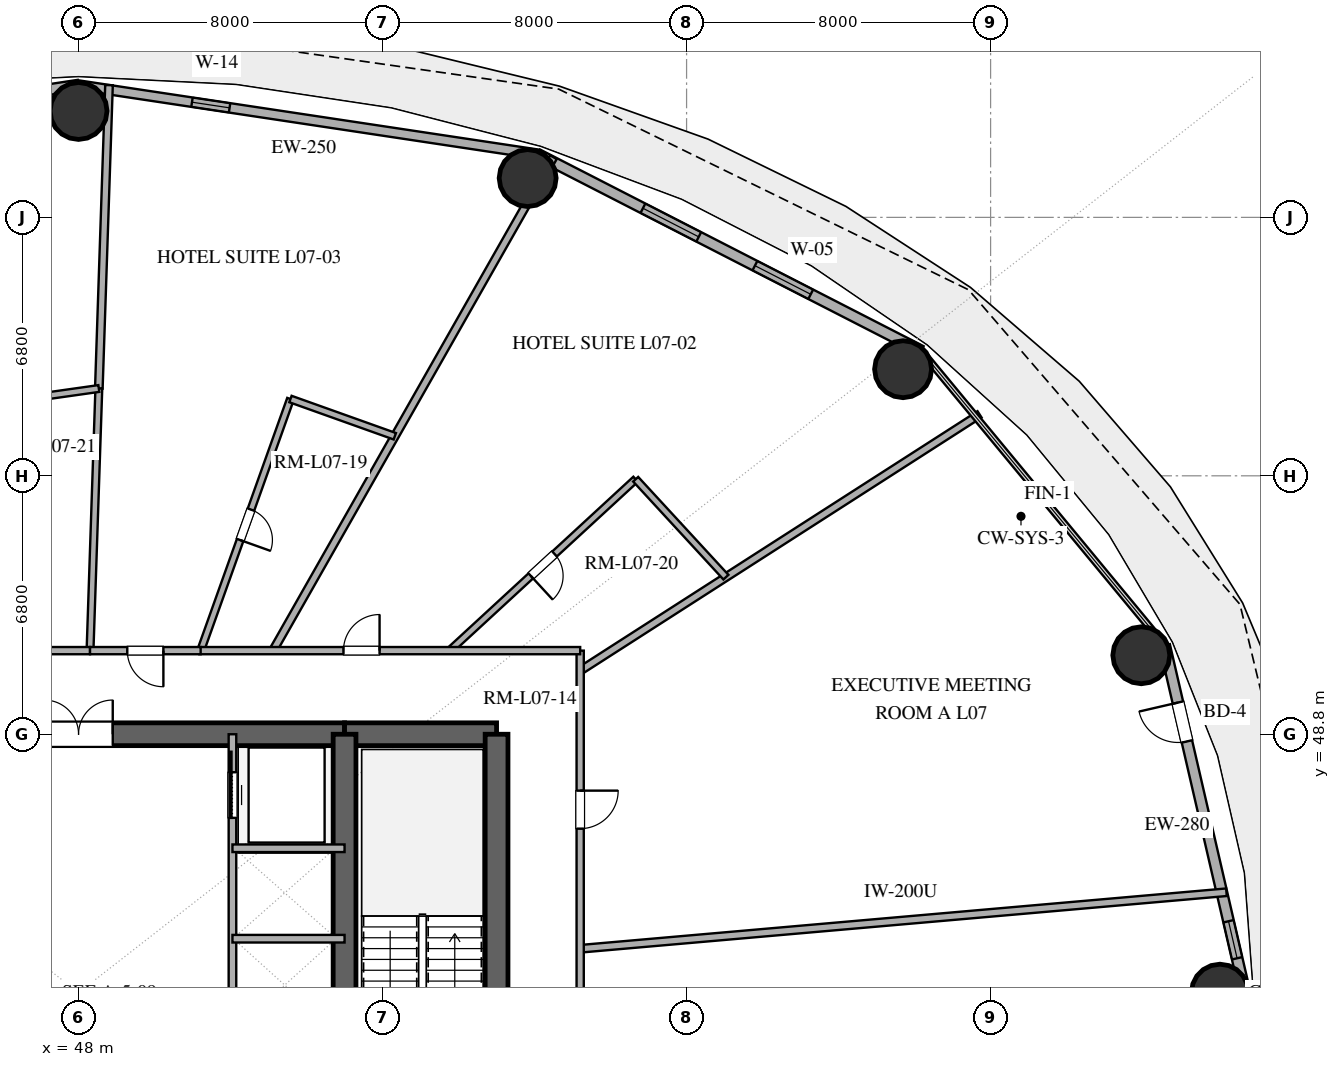
"""IFC4 building model, lengths in metres.
Left out: names, types, materials, properties, quantities, classifications, styles, units other than length and angle.
Written with IfcOpenShell. Run it as: python <this file> out.ifc"""

import sys

from ifc_helpers import new_model, si_unit, direction, frame, frame_2d, origin, origin_2d, place, context, subcontext, project, spatial, rectangle, hollow_circle, extrude, element, fill, save


model = new_model("IFC4")
c1 = context("Model", 3, precision=1e-05, world=origin(), true_north=direction((0.0, 1.0)))
c2 = subcontext(c1, "Body", "Model", "MODEL_VIEW")
j1 = project(units=[si_unit("LENGTHUNIT", "METRE"), si_unit("PLANEANGLEUNIT", "RADIAN")], contexts=[c1])
p1 = place(None, origin())
s1 = spatial("IfcSite", under=j1, at=p1, CompositionType="ELEMENT")
p2 = place(p1, origin())
s2 = spatial("IfcBuilding", under=s1, at=p2, CompositionType="ELEMENT")
p3 = place(p2, frame((0.0, 0.0, 35.4)))
s3 = spatial("IfcBuildingStorey", under=s2, at=p3, CompositionType="ELEMENT", Elevation=35.4)
p4 = place(p3, frame((41.0, 48.8, 0.0), z_axis=(0.0, 0.0, 1.0), x_axis=(1.0, 0.0, 0.0)))
e1 = element("IfcWall", 1, at=p4, inside=s3, PredefinedType="SHEAR", context=c2, shape_type="SweptSolid", body=[
    extrude(rectangle(XDim=14.0, YDim=0.6, at=frame_2d((7.0, 0.0))), origin(), (0.0, 0.0, 1.0), 3.38),
])
p5 = place(p4, frame((6.1, 0.0, 0.0)))
e2 = element("IfcOpeningElement", 2, at=p5, cuts=e1, PredefinedType="OPENING", context=c2, shape_type="SweptSolid", body=[
    extrude(rectangle(XDim=1.8, YDim=2.25, at=frame_2d((0.9, 1.125))), frame((0.0, 0.31, 0.0), z_axis=(0.0, -1.0, 0.0), x_axis=(1.0, 0.0, 0.0)), (0.0, 0.0, 1.0), 0.62),
])
p6 = place(p3, frame((55.0, 48.8, 0.0), z_axis=(0.0, 0.0, 1.0), x_axis=(1.0, 0.0, 0.0)))
e3 = element("IfcWall", 3, at=p6, inside=s3, PredefinedType="SHEAR", context=c2, shape_type="SweptSolid", body=[
    extrude(rectangle(XDim=4.0, YDim=0.6, at=frame_2d((2.0, 0.0))), origin(), (0.0, 0.0, 1.0), 3.38),
])
p7 = place(p3, frame((59.0, 35.2, 0.0), z_axis=(0.0, 0.0, 1.0), x_axis=(0.0, 1.0, 0.0)))
e4 = element("IfcWall", 4, at=p7, inside=s3, PredefinedType="SHEAR", context=c2, shape_type="SweptSolid", body=[
    extrude(rectangle(XDim=13.6, YDim=0.6, at=frame_2d((6.8, 0.0))), origin(), (0.0, 0.0, 1.0), 3.38),
])
p8 = place(p7, frame((1.5, 0.0, 0.0)))
e5 = element("IfcOpeningElement", 5, at=p8, cuts=e4, PredefinedType="OPENING", context=c2, shape_type="SweptSolid", body=[
    extrude(rectangle(XDim=1.2, YDim=2.15, at=frame_2d((0.6, 1.075))), frame((0.0, 0.31, 0.0), z_axis=(0.0, -1.0, 0.0), x_axis=(1.0, 0.0, 0.0)), (0.0, 0.0, 1.0), 0.62),
])
p9 = place(p3, frame((55.0, 35.2, 0.0), z_axis=(0.0, 0.0, 1.0), x_axis=(0.0, 1.0, 0.0)))
e6 = element("IfcWall", 6, at=p9, inside=s3, PredefinedType="SHEAR", context=c2, shape_type="SweptSolid", body=[
    extrude(rectangle(XDim=13.6, YDim=0.6, at=frame_2d((6.8, 0.0))), origin(), (0.0, 0.0, 1.0), 3.38),
])
p10 = place(p9, frame((1.15, 0.0, 0.0)))
e7 = element("IfcOpeningElement", 7, at=p10, cuts=e6, PredefinedType="OPENING", context=c2, shape_type="SweptSolid", body=[
    extrude(rectangle(XDim=1.1, YDim=2.2, at=frame_2d((0.55, 1.1))), frame((0.0, 0.31, 0.0), z_axis=(0.0, -1.0, 0.0), x_axis=(1.0, 0.0, 0.0)), (0.0, 0.0, 1.0), 0.62),
])
for number, where, z_axis, x_axis in (
    (8, (78.035, 42.0, 0.0), (0.0, 0.0, 1.0), (1.0, 0.0, 0.0)),
    (9, (75.966, 50.878, 0.0), (0.0, 0.0, 1.0), (1.0, 0.0, 0.0)),
    (10, (69.697, 58.405, 0.0), (0.0, 0.0, 1.0), (1.0, 0.0, 0.0)),
    (11, (59.818, 63.434, 0.0), (0.0, 0.0, 1.0), (1.0, 0.0, 0.0)),
    (12, (48.0, 65.2, 0.0), (0.0, 0.0, 1.0), (1.0, 0.0, 0.0)),
):
    element("IfcColumn", number, at=place(p3, frame(where, z_axis=z_axis, x_axis=x_axis)), inside=s3, PredefinedType="COLUMN", context=c2, shape_type="SweptSolid", body=[
        extrude(hollow_circle(Radius=0.75, WallThickness=0.04, at=origin_2d()), origin(), (0.0, 0.0, 1.0), 3.38),
    ])
p11 = place(p3, frame((78.696, 42.0, 0.0), z_axis=(0.0, 0.0, 1.0), x_axis=(-0.225454452941, 0.974253709076, 0.0)))
e13 = element("IfcWall", 13, at=p11, inside=s3, PredefinedType="SOLIDWALL", context=c2, shape_type="SweptSolid", body=[
    extrude(rectangle(XDim=9.38, YDim=0.28, at=frame_2d((4.69, 0.0))), origin(), (0.0, 0.0, 1.0), 3.38),
])
p12 = place(p11, frame((6.785, 0.0, 0.0)))
e14 = element("IfcOpeningElement", 14, at=p12, cuts=e13, PredefinedType="OPENING", context=c2, shape_type="SweptSolid", body=[
    extrude(rectangle(XDim=1.05, YDim=2.2, at=frame_2d((0.525, 1.1))), frame((0.0, 0.15, 0.0), z_axis=(0.0, -1.0, 0.0), x_axis=(1.0, 0.0, 0.0)), (0.0, 0.0, 1.0), 0.3),
])
p13 = place(p11, frame((0.929, 0.0, 0.85)))
e15 = element("IfcOpeningElement", 15, at=p13, cuts=e13, PredefinedType="OPENING", context=c2, shape_type="SweptSolid", body=[
    extrude(rectangle(XDim=1.0, YDim=1.8, at=frame_2d((0.5, 0.9))), frame((0.0, 0.15, 0.0), z_axis=(0.0, -1.0, 0.0), x_axis=(1.0, 0.0, 0.0)), (0.0, 0.0, 1.0), 0.3),
])
p14 = place(p3, frame((70.174, 58.886, 0.0), z_axis=(0.0, 0.0, 1.0), x_axis=(-0.889853976658, 0.456245438581, 0.0)))
e16 = element("IfcWall", 16, at=p14, inside=s3, PredefinedType="SOLIDWALL", context=c2, shape_type="SweptSolid", body=[
    extrude(rectangle(XDim=11.346, YDim=0.28, at=frame_2d((5.673, 0.0))), origin(), (0.0, 0.0, 1.0), 3.38),
])
p15 = place(p14, frame((3.267, 0.0, 0.85)))
e17 = element("IfcOpeningElement", 17, at=p15, cuts=e16, PredefinedType="OPENING", context=c2, shape_type="SweptSolid", body=[
    extrude(rectangle(XDim=1.65, YDim=2.0, at=frame_2d((0.825, 1.0))), frame((0.0, 0.15, 0.0), z_axis=(0.0, -1.0, 0.0), x_axis=(1.0, 0.0, 0.0)), (0.0, 0.0, 1.0), 0.3),
])
p16 = place(p14, frame((6.579, 0.0, 0.85)))
e18 = element("IfcOpeningElement", 18, at=p16, cuts=e16, PredefinedType="OPENING", context=c2, shape_type="SweptSolid", body=[
    extrude(rectangle(XDim=1.65, YDim=2.0, at=frame_2d((0.825, 1.0))), frame((0.0, 0.15, 0.0), z_axis=(0.0, -1.0, 0.0), x_axis=(1.0, 0.0, 0.0)), (0.0, 0.0, 1.0), 0.3),
])
p17 = place(p3, frame((60.078, 64.062, 0.0), z_axis=(0.0, 0.0, 1.0), x_axis=(-0.988864835849, 0.148816452121, 0.0)))
e19 = element("IfcWall", 19, at=p17, inside=s3, PredefinedType="SOLIDWALL", context=c2, shape_type="SweptSolid", body=[
    extrude(rectangle(XDim=12.214, YDim=0.25, at=frame_2d((6.107, 0.0))), origin(), (0.0, 0.0, 1.0), 3.38),
])
p18 = place(p17, frame((8.195, 0.0, 1.42)))
e20 = element("IfcOpeningElement", 20, at=p18, cuts=e19, PredefinedType="OPENING", context=c2, shape_type="SweptSolid", body=[
    extrude(rectangle(XDim=1.0, YDim=1.05, at=frame_2d((0.5, 0.525))), frame((0.0, 0.135, 0.0), z_axis=(0.0, -1.0, 0.0), x_axis=(1.0, 0.0, 0.0)), (0.0, 0.0, 1.0), 0.27),
])
p19 = place(p3, frame((48.0, 65.88, 0.0), z_axis=(0.0, 0.0, 1.0), x_axis=(-0.988864835849, -0.148816452121, 0.0)))
e21 = element("IfcWall", 21, at=p19, inside=s3, PredefinedType="SOLIDWALL", context=c2, shape_type="SweptSolid", body=[
    extrude(rectangle(XDim=12.214, YDim=0.28, at=frame_2d((6.107, 0.0))), origin(), (0.0, 0.0, 1.0), 3.38),
])
p20 = place(p19, frame((1.531, 0.0, 0.0)))
e22 = element("IfcOpeningElement", 22, at=p20, cuts=e21, PredefinedType="OPENING", context=c2, shape_type="SweptSolid", body=[
    extrude(rectangle(XDim=1.6, YDim=2.25, at=frame_2d((0.8, 1.125))), frame((0.0, 0.15, 0.0), z_axis=(0.0, -1.0, 0.0), x_axis=(1.0, 0.0, 0.0)), (0.0, 0.0, 1.0), 0.3),
])
p21 = place(p3, frame((52.05, 38.4, 0.0), z_axis=(0.0, 0.0, 1.0), x_axis=(0.0, 1.0, 0.0)))
e23 = element("IfcWall", 23, at=p21, inside=s3, PredefinedType="SOLIDWALL", context=c2, shape_type="SweptSolid", body=[
    extrude(rectangle(XDim=10.4, YDim=0.2, at=frame_2d((5.2, 0.0))), origin(), (0.0, 0.0, 1.0), 2.74),
])
p22 = place(p21, frame((8.2, 0.0, 0.0)))
e24 = element("IfcOpeningElement", 24, at=p22, cuts=e23, PredefinedType="OPENING", context=c2, shape_type="SweptSolid", body=[
    extrude(rectangle(XDim=1.2, YDim=2.2, at=frame_2d((0.6, 1.1))), frame((0.0, 0.11, 0.0), z_axis=(0.0, -1.0, 0.0), x_axis=(1.0, 0.0, 0.0)), (0.0, 0.0, 1.0), 0.22),
])
for number, where, z_axis, x_axis in (
    (25, (52.05, 43.42, 0.0), (0.0, 0.0, 1.0), (1.0, 0.0, 0.0)),
    (26, (52.05, 45.8, 0.0), (0.0, 0.0, 1.0), (1.0, 0.0, 0.0)),
):
    element("IfcWall", number, at=place(p3, frame(where, z_axis=z_axis, x_axis=x_axis)), inside=s3, PredefinedType="SOLIDWALL", context=c2, shape_type="SweptSolid", body=[
        extrude(rectangle(XDim=2.95, YDim=0.2, at=frame_2d((1.475, 0.0))), origin(), (0.0, 0.0, 1.0), 2.74),
    ])
p23 = place(p3, frame((61.2, 43.155, 0.0), z_axis=(0.0, 0.0, 1.0), x_axis=(0.996194943742, 0.087152934912, 0.0)))
e27 = element("IfcWall", 27, at=p23, inside=s3, PredefinedType="PARTITIONING", context=c2, shape_type="SweptSolid", body=[
    extrude(rectangle(XDim=17.071, YDim=0.2, at=frame_2d((8.536, 0.0))), origin(), (0.0, 0.0, 1.0), 2.74),
])
p24 = place(p3, frame((53.116, 51.0, 0.0), z_axis=(0.0, 0.0, 1.0), x_axis=(0.494167535405, 0.869366693031, 0.0)))
e28 = element("IfcWall", 28, at=p24, inside=s3, PredefinedType="PARTITIONING", context=c2, shape_type="SweptSolid", body=[
    extrude(rectangle(XDim=14.934, YDim=0.2, at=frame_2d((7.467, 0.0))), origin(), (0.0, 0.0, 1.0), 2.74),
])
p25 = place(p3, frame((48.802, 65.88, 0.0), z_axis=(0.0, 0.0, 1.0), x_axis=(-0.033562144005, -0.999436632553, 0.0)))
e29 = element("IfcWall", 29, at=p25, inside=s3, PredefinedType="PARTITIONING", context=c2, shape_type="SweptSolid", body=[
    extrude(rectangle(XDim=7.987, YDim=0.2, at=frame_2d((3.994, 0.0))), origin(), (0.0, 0.0, 1.0), 2.74),
])
p26 = place(p3, frame((61.2, 50.472, 0.0), z_axis=(0.0, 0.0, 1.0), x_axis=(0.841576538847, 0.540137879863, 0.0)))
e30 = element("IfcWall", 30, at=p26, inside=s3, PredefinedType="PARTITIONING", context=c2, shape_type="SweptSolid", body=[
    extrude(rectangle(XDim=12.487, YDim=0.2, at=frame_2d((6.244, 0.0))), origin(), (0.0, 0.0, 1.0), 2.74),
])
p27 = place(p3, frame((61.2, 51.0, 0.0), z_axis=(0.0, 0.0, 1.0), x_axis=(0.0, -1.0, 0.0)))
e31 = element("IfcWall", 31, at=p27, inside=s3, PredefinedType="PARTITIONING", context=c2, shape_type="SweptSolid", body=[
    extrude(rectangle(XDim=14.554, YDim=0.19, at=frame_2d((7.277, 0.0))), origin(), (0.0, 0.0, 1.0), 2.74),
])
p28 = place(p27, frame((3.684, 0.0, 0.0)))
e32 = element("IfcOpeningElement", 32, at=p28, cuts=e31, PredefinedType="OPENING", context=c2, shape_type="SweptSolid", body=[
    extrude(rectangle(XDim=1.0, YDim=2.2, at=frame_2d((0.5, 1.1))), frame((0.0, 0.105, 0.0), z_axis=(0.0, -1.0, 0.0), x_axis=(1.0, 0.0, 0.0)), (0.0, 0.0, 1.0), 0.21),
])
p29 = place(p27, frame((9.438, 0.0, 0.0)))
e33 = element("IfcOpeningElement", 33, at=p29, cuts=e31, PredefinedType="OPENING", context=c2, shape_type="SweptSolid", body=[
    extrude(rectangle(XDim=0.95, YDim=2.15, at=frame_2d((0.475, 1.075))), frame((0.0, 0.105, 0.0), z_axis=(0.0, -1.0, 0.0), x_axis=(1.0, 0.0, 0.0)), (0.0, 0.0, 1.0), 0.21),
])
p30 = place(p3, frame((53.576, 57.621, 0.0), z_axis=(0.0, 0.0, 1.0), x_axis=(-0.336213191961, -0.941785904307, 0.0)))
e34 = element("IfcWall", 34, at=p30, inside=s3, PredefinedType="PLUMBINGWALL", context=c2, shape_type="SweptSolid", body=[
    extrude(rectangle(XDim=7.03, YDim=0.18, at=frame_2d((3.515, 0.0))), origin(), (0.0, 0.0, 1.0), 2.74),
])
p31 = place(p30, frame((3.09, 0.0, 0.0)))
e35 = element("IfcOpeningElement", 35, at=p31, cuts=e34, PredefinedType="OPENING", context=c2, shape_type="SweptSolid", body=[
    extrude(rectangle(XDim=0.85, YDim=2.1, at=frame_2d((0.425, 1.05))), frame((0.0, 0.1, 0.0), z_axis=(0.0, -1.0, 0.0), x_axis=(1.0, 0.0, 0.0)), (0.0, 0.0, 1.0), 0.2),
])
p32 = place(p3, frame((48.534, 57.897, 0.0), z_axis=(0.0, 0.0, 1.0), x_axis=(-0.033537457551, -0.999437461246, 0.0)))
e36 = element("IfcWall", 36, at=p32, inside=s3, PredefinedType="PLUMBINGWALL", context=c2, shape_type="SweptSolid", body=[
    extrude(rectangle(XDim=6.901, YDim=0.18, at=frame_2d((3.451, 0.0))), origin(), (0.0, 0.0, 1.0), 2.74),
])
p33 = place(p3, frame((62.66, 55.51, 0.0), z_axis=(0.0, 0.0, 1.0), x_axis=(-0.735369975398, -0.67766584633, 0.0)))
e37 = element("IfcWall", 37, at=p33, inside=s3, PredefinedType="PLUMBINGWALL", context=c2, shape_type="SweptSolid", body=[
    extrude(rectangle(XDim=6.655, YDim=0.18, at=frame_2d((3.328, 0.0))), origin(), (0.0, 0.0, 1.0), 2.74),
])
p34 = place(p33, frame((2.903, 0.0, 0.0)))
e38 = element("IfcOpeningElement", 38, at=p34, cuts=e37, PredefinedType="OPENING", context=c2, shape_type="SweptSolid", body=[
    extrude(rectangle(XDim=0.85, YDim=2.1, at=frame_2d((0.425, 1.05))), frame((0.0, 0.1, 0.0), z_axis=(0.0, -1.0, 0.0), x_axis=(1.0, 0.0, 0.0)), (0.0, 0.0, 1.0), 0.2),
])
p35 = place(p3, frame((51.179, 51.0, 0.0), z_axis=(0.0, 0.0, 1.0), x_axis=(1.0, 0.0, 0.0)))
e39 = element("IfcWall", 39, at=p35, inside=s3, PredefinedType="PARTITIONING", context=c2, shape_type="SweptSolid", body=[
    extrude(rectangle(XDim=10.021, YDim=0.19, at=frame_2d((5.01, 0.0))), origin(), (0.0, 0.0, 1.0), 2.74),
])
p36 = place(p35, frame((3.792, 0.0, 0.0)))
e40 = element("IfcOpeningElement", 40, at=p36, cuts=e39, PredefinedType="OPENING", context=c2, shape_type="SweptSolid", body=[
    extrude(rectangle(XDim=0.95, YDim=2.15, at=frame_2d((0.475, 1.075))), frame((0.0, 0.105, 0.0), z_axis=(0.0, -1.0, 0.0), x_axis=(1.0, 0.0, 0.0)), (0.0, 0.0, 1.0), 0.21),
])
p37 = place(p3, frame((65.035, 52.933, 0.0), z_axis=(0.0, 0.0, 1.0), x_axis=(-0.677675106239, 0.735361442002, 0.0)))
e41 = element("IfcWall", 41, at=p37, inside=s3, PredefinedType="PLUMBINGWALL", context=c2, shape_type="SweptSolid", body=[
    extrude(rectangle(XDim=3.504, YDim=0.18, at=frame_2d((1.752, 0.0))), origin(), (0.0, 0.0, 1.0), 2.74),
])
p38 = place(p3, frame((43.62, 51.0, 0.0), z_axis=(0.0, 0.0, 1.0), x_axis=(1.0, 0.0, 0.0)))
e42 = element("IfcWall", 42, at=p38, inside=s3, PredefinedType="PARTITIONING", context=c2, shape_type="SweptSolid", body=[
    extrude(rectangle(XDim=4.683, YDim=0.19, at=frame_2d((2.341, 0.0))), origin(), (0.0, 0.0, 1.0), 2.74),
])
p39 = place(p38, frame((1.095, 0.0, 0.0)))
e43 = element("IfcOpeningElement", 43, at=p39, cuts=e42, PredefinedType="OPENING", context=c2, shape_type="SweptSolid", body=[
    extrude(rectangle(XDim=0.95, YDim=2.15, at=frame_2d((0.475, 1.075))), frame((0.0, 0.105, 0.0), z_axis=(0.0, -1.0, 0.0), x_axis=(1.0, 0.0, 0.0)), (0.0, 0.0, 1.0), 0.21),
])
p40 = place(p3, frame((56.322, 56.64, 0.0), z_axis=(0.0, 0.0, 1.0), x_axis=(-0.94177979862, 0.336230294457, 0.0)))
e44 = element("IfcWall", 44, at=p40, inside=s3, PredefinedType="PLUMBINGWALL", context=c2, shape_type="SweptSolid", body=[
    extrude(rectangle(XDim=2.915, YDim=0.18, at=frame_2d((1.458, 0.0))), origin(), (0.0, 0.0, 1.0), 2.74),
])
p41 = place(p3, frame((51.213, 51.0, 0.0), z_axis=(0.0, 0.0, 1.0), x_axis=(-1.0, 0.0, 0.0)))
e45 = element("IfcWall", 45, at=p41, inside=s3, PredefinedType="PARTITIONING", context=c2, shape_type="SweptSolid", body=[
    extrude(rectangle(XDim=2.911, YDim=0.19, at=frame_2d((1.455, 0.0))), origin(), (0.0, 0.0, 1.0), 2.74),
])
p42 = place(p41, frame((0.98, 0.0, 0.0)))
e46 = element("IfcOpeningElement", 46, at=p42, cuts=e45, PredefinedType="OPENING", context=c2, shape_type="SweptSolid", body=[
    extrude(rectangle(XDim=0.95, YDim=2.15, at=frame_2d((0.475, 1.075))), frame((0.0, 0.105, 0.0), z_axis=(0.0, -1.0, 0.0), x_axis=(1.0, 0.0, 0.0)), (0.0, 0.0, 1.0), 0.21),
])
p43 = place(p3, frame((45.807, 57.512, 0.0), z_axis=(0.0, 0.0, 1.0), x_axis=(0.990152382036, 0.139993786823, 0.0)))
e47 = element("IfcWall", 47, at=p43, inside=s3, PredefinedType="PLUMBINGWALL", context=c2, shape_type="SweptSolid", body=[
    extrude(rectangle(XDim=2.754, YDim=0.18, at=frame_2d((1.377, 0.0))), origin(), (0.0, 0.0, 1.0), 2.74),
])
p44 = place(p12, origin())
e48 = element("IfcDoor", 48, at=p44, inside=s3, OperationType="SINGLE_SWING_RIGHT", PredefinedType="DOOR", context=c2, shape_type="SweptSolid", body=[
    extrude(rectangle(XDim=1.05, YDim=2.2, at=frame_2d((0.525, 1.1))), frame((0.0, 0.025, 0.0), z_axis=(0.0, -1.0, 0.0), x_axis=(1.0, 0.0, 0.0)), (0.0, 0.0, 1.0), 0.05),
])
fill(e14, e48)
p45 = place(p15, origin())
e49 = element("IfcWindow", 49, at=p45, inside=s3, PartitioningType="SINGLE_PANEL", PredefinedType="WINDOW", context=c2, shape_type="SweptSolid", body=[
    extrude(rectangle(XDim=1.65, YDim=2.0, at=frame_2d((0.825, 1.0))), frame((0.0, 0.03, 0.0), z_axis=(0.0, -1.0, 0.0), x_axis=(1.0, 0.0, 0.0)), (0.0, 0.0, 1.0), 0.06),
])
fill(e17, e49)
p46 = place(p16, origin())
e50 = element("IfcWindow", 50, at=p46, inside=s3, PartitioningType="SINGLE_PANEL", PredefinedType="WINDOW", context=c2, shape_type="SweptSolid", body=[
    extrude(rectangle(XDim=1.65, YDim=2.0, at=frame_2d((0.825, 1.0))), frame((0.0, 0.03, 0.0), z_axis=(0.0, -1.0, 0.0), x_axis=(1.0, 0.0, 0.0)), (0.0, 0.0, 1.0), 0.06),
])
fill(e18, e50)
p47 = place(p18, origin())
e51 = element("IfcWindow", 51, at=p47, inside=s3, PartitioningType="SINGLE_PANEL", PredefinedType="WINDOW", context=c2, shape_type="SweptSolid", body=[
    extrude(rectangle(XDim=1.0, YDim=1.05, at=frame_2d((0.5, 0.525))), frame((0.0, 0.03, 0.0), z_axis=(0.0, -1.0, 0.0), x_axis=(1.0, 0.0, 0.0)), (0.0, 0.0, 1.0), 0.06),
])
fill(e20, e51)
p48 = place(p13, origin())
e52 = element("IfcWindow", 52, at=p48, inside=s3, PartitioningType="SINGLE_PANEL", PredefinedType="WINDOW", context=c2, shape_type="SweptSolid", body=[
    extrude(rectangle(XDim=1.0, YDim=1.8, at=frame_2d((0.5, 0.9))), frame((0.0, 0.03, 0.0), z_axis=(0.0, -1.0, 0.0), x_axis=(1.0, 0.0, 0.0)), (0.0, 0.0, 1.0), 0.06),
])
fill(e15, e52)
p49 = place(p5, origin())
e53 = element("IfcDoor", 53, at=p49, inside=s3, OperationType="DOUBLE_DOOR_SINGLE_SWING", PredefinedType="DOOR", context=c2, shape_type="SweptSolid", body=[
    extrude(rectangle(XDim=1.8, YDim=2.25, at=frame_2d((0.9, 1.125))), frame((0.0, 0.025, 0.0), z_axis=(0.0, -1.0, 0.0), x_axis=(1.0, 0.0, 0.0)), (0.0, 0.0, 1.0), 0.05),
])
fill(e2, e53)
p50 = place(p22, origin())
e54 = element("IfcDoor", 54, at=p50, inside=s3, OperationType="SLIDING_TO_RIGHT", PredefinedType="DOOR", context=c2, shape_type="SweptSolid", body=[
    extrude(rectangle(XDim=1.2, YDim=2.2, at=frame_2d((0.6, 1.1))), frame((0.0, 0.025, 0.0), z_axis=(0.0, -1.0, 0.0), x_axis=(1.0, 0.0, 0.0)), (0.0, 0.0, 1.0), 0.05),
])
fill(e24, e54)
p51 = place(p28, origin())
e55 = element("IfcDoor", 55, at=p51, inside=s3, OperationType="SINGLE_SWING_LEFT", PredefinedType="DOOR", context=c2, shape_type="SweptSolid", body=[
    extrude(rectangle(XDim=1.0, YDim=2.2, at=frame_2d((0.5, 1.1))), frame((0.0, 0.025, 0.0), z_axis=(0.0, -1.0, 0.0), x_axis=(1.0, 0.0, 0.0)), (0.0, 0.0, 1.0), 0.05),
])
fill(e32, e55)
p52 = place(p31, origin())
e56 = element("IfcDoor", 56, at=p52, inside=s3, OperationType="SINGLE_SWING_RIGHT", PredefinedType="DOOR", context=c2, shape_type="SweptSolid", body=[
    extrude(rectangle(XDim=0.85, YDim=2.1, at=frame_2d((0.425, 1.05))), frame((0.0, 0.025, 0.0), z_axis=(0.0, -1.0, 0.0), x_axis=(1.0, 0.0, 0.0)), (0.0, 0.0, 1.0), 0.05),
])
fill(e35, e56)
p53 = place(p34, origin())
e57 = element("IfcDoor", 57, at=p53, inside=s3, OperationType="SINGLE_SWING_RIGHT", PredefinedType="DOOR", context=c2, shape_type="SweptSolid", body=[
    extrude(rectangle(XDim=0.85, YDim=2.1, at=frame_2d((0.425, 1.05))), frame((0.0, 0.025, 0.0), z_axis=(0.0, -1.0, 0.0), x_axis=(1.0, 0.0, 0.0)), (0.0, 0.0, 1.0), 0.05),
])
fill(e38, e57)
p54 = place(p36, origin())
e58 = element("IfcDoor", 58, at=p54, inside=s3, OperationType="SINGLE_SWING_RIGHT", PredefinedType="DOOR", context=c2, shape_type="SweptSolid", body=[
    extrude(rectangle(XDim=0.95, YDim=2.15, at=frame_2d((0.475, 1.075))), frame((0.0, 0.025, 0.0), z_axis=(0.0, -1.0, 0.0), x_axis=(1.0, 0.0, 0.0)), (0.0, 0.0, 1.0), 0.05),
])
fill(e40, e58)
p55 = place(p42, origin())
e59 = element("IfcDoor", 59, at=p55, inside=s3, OperationType="SINGLE_SWING_LEFT", PredefinedType="DOOR", context=c2, shape_type="SweptSolid", body=[
    extrude(rectangle(XDim=0.95, YDim=2.15, at=frame_2d((0.475, 1.075))), frame((0.0, 0.025, 0.0), z_axis=(0.0, -1.0, 0.0), x_axis=(1.0, 0.0, 0.0)), (0.0, 0.0, 1.0), 0.05),
])
fill(e46, e59)
save(model, sys.argv[1])
